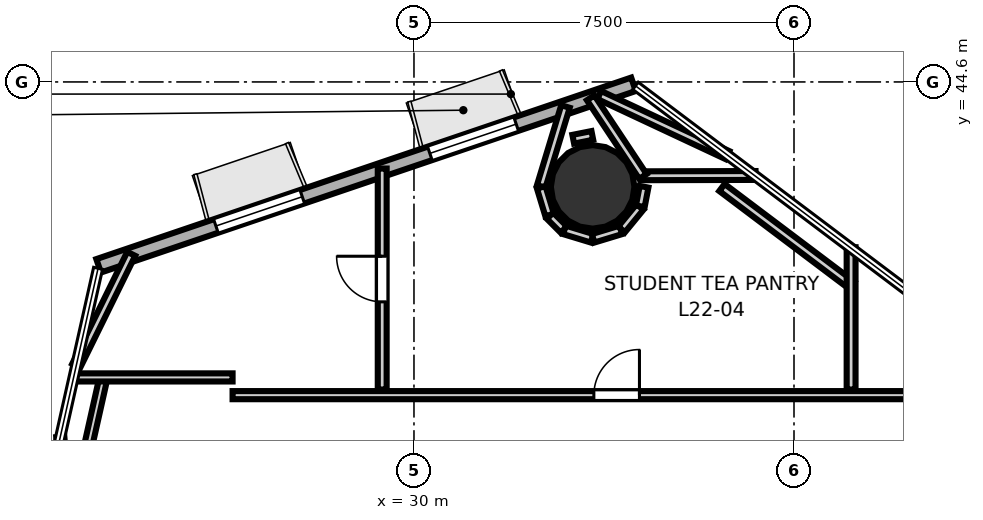
"""IFC4 building model, lengths in metres.
Left out: names, types, materials, properties, quantities, classifications, styles, units other than length and angle.
Written with IfcOpenShell. Run it as: python <this file> out.ifc"""

import sys

from ifc_helpers import new_model, si_unit, direction, frame, frame_2d, origin, origin_2d, place, context, subcontext, project, spatial, rectangle, hollow_circle, extrude, element, fill, save


model = new_model("IFC4")
c1 = context("Model", 3, precision=1e-05, world=origin(), true_north=direction((0.0, 1.0)))
c2 = subcontext(c1, "Body", "Model", "MODEL_VIEW")
j1 = project(units=[si_unit("LENGTHUNIT", "METRE"), si_unit("PLANEANGLEUNIT", "RADIAN")], contexts=[c1])
p1 = place(None, origin())
s1 = spatial("IfcSite", under=j1, at=p1, CompositionType="ELEMENT")
p2 = place(p1, origin())
s2 = spatial("IfcBuilding", under=s1, at=p2, CompositionType="ELEMENT")
p3 = place(p2, frame((0.0, 0.0, 89.5)))
s3 = spatial("IfcBuildingStorey", under=s2, at=p3, CompositionType="ELEMENT", Elevation=89.5)
p4 = place(p3, frame((33.526, 42.529, 0.0), z_axis=(0.0, 0.0, 1.0), x_axis=(1.0, 0.0, 0.0)))
e1 = element("IfcColumn", 1, at=p4, inside=s3, PredefinedType="COLUMN", context=c2, shape_type="SweptSolid", body=[
    extrude(hollow_circle(Radius=0.825, WallThickness=0.04, at=origin_2d()), origin(), (0.0, 0.0, 1.0), 3.7),
])
p5 = place(p3, frame((34.332, 44.553, 0.0), z_axis=(0.0, 0.0, 1.0), x_axis=(-0.946952159866, -0.321374558615, 0.0)))
e2 = element("IfcWall", 2, at=p5, inside=s3, PredefinedType="SOLIDWALL", context=c2, shape_type="SweptSolid", body=[
    extrude(rectangle(XDim=11.147, YDim=0.28, at=frame_2d((5.573, 0.0))), origin(), (0.0, 0.0, 1.0), 3.4),
])
p6 = place(p5, frame((2.444, 0.0, 0.85)))
e3 = element("IfcOpeningElement", 3, at=p6, cuts=e2, PredefinedType="OPENING", context=c2, shape_type="SweptSolid", body=[
    extrude(rectangle(XDim=1.8, YDim=2.1, at=frame_2d((0.9, 1.05))), frame((0.0, 0.15, 0.0), z_axis=(0.0, -1.0, 0.0), x_axis=(1.0, 0.0, 0.0)), (0.0, 0.0, 1.0), 0.3),
])
p7 = place(p5, frame((6.903, 0.0, 0.85)))
e4 = element("IfcOpeningElement", 4, at=p7, cuts=e2, PredefinedType="OPENING", context=c2, shape_type="SweptSolid", body=[
    extrude(rectangle(XDim=1.8, YDim=2.1, at=frame_2d((0.9, 1.05))), frame((0.0, 0.15, 0.0), z_axis=(0.0, -1.0, 0.0), x_axis=(1.0, 0.0, 0.0)), (0.0, 0.0, 1.0), 0.3),
])
p8 = place(p3, frame((23.581, 31.197, 0.0), z_axis=(0.0, 0.0, 1.0), x_axis=(-0.087369191834, 0.996176000674, 0.0)))
e5 = element("IfcWall", 5, at=p8, inside=s3, PredefinedType="PARTITIONING", context=c2, shape_type="SweptSolid", body=[
    extrude(rectangle(XDim=6.424, YDim=0.16, at=frame_2d((3.212, 0.0))), origin(), (0.0, 0.0, 1.0), 2.678),
])
p9 = place(p3, frame((23.58, 37.464, 0.0), z_axis=(0.0, 0.0, 1.0), x_axis=(0.219055756509, 0.97571234262, 0.0)))
e6 = element("IfcWall", 6, at=p9, inside=s3, PredefinedType="PARTITIONING", context=c2, shape_type="SweptSolid", body=[
    extrude(rectangle(XDim=1.362, YDim=0.16, at=frame_2d((0.681, 0.0))), origin(), (0.0, 0.0, 1.0), 2.72),
])
p10 = place(p3, frame((23.262, 38.769, 0.0), z_axis=(0.0, 0.0, 1.0), x_axis=(1.0, 0.0, 0.0)))
e7 = element("IfcWall", 7, at=p10, inside=s3, PredefinedType="PARTITIONING", context=c2, shape_type="SweptSolid", body=[
    extrude(rectangle(XDim=3.157, YDim=0.16, at=frame_2d((1.579, 0.0))), origin(), (0.0, 0.0, 1.0), 2.72),
])
p11 = place(p3, frame((26.42, 38.419, 0.0), z_axis=(0.0, 0.0, 1.0), x_axis=(1.0, 0.0, 0.0)))
e8 = element("IfcWall", 8, at=p11, inside=s3, PredefinedType="PARTITIONING", context=c2, shape_type="SweptSolid", body=[
    extrude(rectangle(XDim=16.075, YDim=0.16, at=frame_2d((8.037, 0.0))), origin(), (0.0, 0.0, 1.0), 2.678),
])
p12 = place(p11, frame((7.13, 0.0, 0.0)))
e9 = element("IfcOpeningElement", 9, at=p12, cuts=e8, PredefinedType="OPENING", context=c2, shape_type="SweptSolid", body=[
    extrude(rectangle(XDim=0.9, YDim=2.1, at=frame_2d((0.45, 1.05))), frame((0.0, 0.09, 0.0), z_axis=(0.0, -1.0, 0.0), x_axis=(1.0, 0.0, 0.0)), (0.0, 0.0, 1.0), 0.18),
])
p13 = place(p3, frame((29.373, 38.53, 0.0), z_axis=(0.0, 0.0, 1.0), x_axis=(0.0, 1.0, 0.0)))
e10 = element("IfcWall", 10, at=p13, inside=s3, PredefinedType="PLUMBINGWALL", context=c2, shape_type="SweptSolid", body=[
    extrude(rectangle(XDim=4.361, YDim=0.175, at=frame_2d((2.18, 0.0))), origin(), (0.0, 0.0, 1.0), 2.72),
])
p14 = place(p13, frame((1.73, 0.0, 0.0)))
e11 = element("IfcOpeningElement", 11, at=p14, cuts=e10, PredefinedType="OPENING", context=c2, shape_type="SweptSolid", body=[
    extrude(rectangle(XDim=0.9, YDim=2.1, at=frame_2d((0.45, 1.05))), frame((0.0, 0.097, 0.0), z_axis=(0.0, -1.0, 0.0), x_axis=(1.0, 0.0, 0.0)), (0.0, 0.0, 1.0), 0.195),
])
p15 = place(p3, frame((33.656, 44.342, 0.0), z_axis=(0.0, 0.0, 1.0), x_axis=(0.905579565103, -0.42417643884, 0.0)))
e12 = element("IfcWall", 12, at=p15, inside=s3, PredefinedType="PLUMBINGWALL", context=c2, shape_type="SweptSolid", body=[
    extrude(rectangle(XDim=2.794, YDim=0.175, at=frame_2d((1.397, 0.0))), origin(), (0.0, 0.0, 1.0), 2.72),
])
p16 = place(p3, frame((36.74, 42.754, 0.0), z_axis=(0.0, 0.0, 1.0), x_axis=(-0.999996880442, -0.002497820184, 0.0)))
e13 = element("IfcWall", 13, at=p16, inside=s3, PredefinedType="PLUMBINGWALL", context=c2, shape_type="SweptSolid", body=[
    extrude(rectangle(XDim=2.248, YDim=0.175, at=frame_2d((1.124, 0.0))), origin(), (0.0, 0.0, 1.0), 2.72),
])
p17 = place(p3, frame((34.518, 42.735, 0.0), z_axis=(0.0, 0.0, 1.0), x_axis=(-0.553581470988, 0.832795025789, 0.0)))
e14 = element("IfcWall", 14, at=p17, inside=s3, PredefinedType="PLUMBINGWALL", context=c2, shape_type="SweptSolid", body=[
    extrude(rectangle(XDim=1.864, YDim=0.175, at=frame_2d((0.932, 0.0))), origin(), (0.0, 0.0, 1.0), 2.72),
])
p18 = place(p3, frame((33.52, 43.544, 0.0), z_axis=(0.0, 0.0, 1.0), x_axis=(-0.980799947725, -0.195016569917, 0.0)))
e15 = element("IfcWall", 15, at=p18, inside=s3, PredefinedType="PLUMBINGWALL", context=c2, shape_type="SweptSolid", body=[
    extrude(rectangle(XDim=0.384, YDim=0.175, at=frame_2d((0.192, 0.0))), origin(), (0.0, 0.0, 1.0), 2.72),
])
p19 = place(p3, frame((32.99, 44.115, 0.0), z_axis=(0.0, 0.0, 1.0), x_axis=(-0.290336280759, -0.956924680461, 0.0)))
e16 = element("IfcWall", 16, at=p19, inside=s3, PredefinedType="PLUMBINGWALL", context=c2, shape_type="SweptSolid", body=[
    extrude(rectangle(XDim=1.648, YDim=0.175, at=frame_2d((0.824, 0.0))), origin(), (0.0, 0.0, 1.0), 2.72),
])
p20 = place(p3, frame((32.511, 42.52, 0.0), z_axis=(0.0, 0.0, 1.0), x_axis=(0.290362912899, -0.956916599716, 0.0)))
e17 = element("IfcWall", 17, at=p20, inside=s3, PredefinedType="PLUMBINGWALL", context=c2, shape_type="SweptSolid", body=[
    extrude(rectangle(XDim=0.572, YDim=0.175, at=frame_2d((0.286, 0.0))), origin(), (0.0, 0.0, 1.0), 2.72),
])
p21 = place(p3, frame((32.685, 41.96, 0.0), z_axis=(0.0, 0.0, 1.0), x_axis=(0.707106781187, -0.707106781187, 0.0)))
e18 = element("IfcWall", 18, at=p21, inside=s3, PredefinedType="PLUMBINGWALL", context=c2, shape_type="SweptSolid", body=[
    extrude(rectangle(XDim=0.384, YDim=0.175, at=frame_2d((0.192, 0.0))), origin(), (0.0, 0.0, 1.0), 2.678),
])
p22 = place(p3, frame((32.97, 41.68, 0.0), z_axis=(0.0, 0.0, 1.0), x_axis=(0.956952578659, -0.290244314669, 0.0)))
e19 = element("IfcWall", 19, at=p22, inside=s3, PredefinedType="PLUMBINGWALL", context=c2, shape_type="SweptSolid", body=[
    extrude(rectangle(XDim=0.572, YDim=0.175, at=frame_2d((0.286, 0.0))), origin(), (0.0, 0.0, 1.0), 2.678),
])
p23 = place(p3, frame((33.535, 41.514, 0.0), z_axis=(0.0, 0.0, 1.0), x_axis=(0.956952578659, 0.290244314669, 0.0)))
e20 = element("IfcWall", 20, at=p23, inside=s3, PredefinedType="PLUMBINGWALL", context=c2, shape_type="SweptSolid", body=[
    extrude(rectangle(XDim=0.572, YDim=0.175, at=frame_2d((0.286, 0.0))), origin(), (0.0, 0.0, 1.0), 2.72),
])
p24 = place(p3, frame((34.097, 41.69, 0.0), z_axis=(0.0, 0.0, 1.0), x_axis=(0.634329694458, 0.773062635709, 0.0)))
e21 = element("IfcWall", 21, at=p24, inside=s3, PredefinedType="PLUMBINGWALL", context=c2, shape_type="SweptSolid", body=[
    extrude(rectangle(XDim=0.572, YDim=0.175, at=frame_2d((0.286, 0.0))), origin(), (0.0, 0.0, 1.0), 2.678),
])
p25 = place(p3, frame((34.467, 42.146, 0.0), z_axis=(0.0, 0.0, 1.0), x_axis=(0.188455212737, 0.982081785185, 0.0)))
e22 = element("IfcWall", 22, at=p25, inside=s3, PredefinedType="PLUMBINGWALL", context=c2, shape_type="SweptSolid", body=[
    extrude(rectangle(XDim=0.393, YDim=0.175, at=frame_2d((0.196, 0.0))), origin(), (0.0, 0.0, 1.0), 2.72),
])
p26 = place(p3, frame((36.078, 42.517, 0.0), z_axis=(0.0, 0.0, 1.0), x_axis=(0.798764872269, -0.601643315286, 0.0)))
e23 = element("IfcWall", 23, at=p26, inside=s3, PredefinedType="PLUMBINGWALL", context=c2, shape_type="SweptSolid", body=[
    extrude(rectangle(XDim=3.207, YDim=0.175, at=frame_2d((1.603, 0.0))), origin(), (0.0, 0.0, 1.0), 2.72),
])
p27 = place(p3, frame((38.627, 41.338, 0.0), z_axis=(0.0, 0.0, 1.0), x_axis=(0.0, -1.0, 0.0)))
e24 = element("IfcWall", 24, at=p27, inside=s3, PredefinedType="PLUMBINGWALL", context=c2, shape_type="SweptSolid", body=[
    extrude(rectangle(XDim=2.808, YDim=0.175, at=frame_2d((1.404, 0.0))), origin(), (0.0, 0.0, 1.0), 2.678),
])
p28 = place(p3, frame((23.334, 38.999, 0.0), z_axis=(0.0, 0.0, 1.0), x_axis=(0.44113104015, 0.897442703138, 0.0)))
e25 = element("IfcWall", 25, at=p28, inside=s3, PredefinedType="PLUMBINGWALL", context=c2, shape_type="SweptSolid", body=[
    extrude(rectangle(XDim=2.461, YDim=0.175, at=frame_2d((1.23, 0.0))), origin(), (0.0, 0.0, 1.0), 2.72),
])
p29 = place(p12, origin())
e26 = element("IfcDoor", 26, at=p29, inside=s3, OperationType="SINGLE_SWING_RIGHT", PredefinedType="DOOR", context=c2, shape_type="SweptSolid", body=[
    extrude(rectangle(XDim=0.9, YDim=2.1, at=frame_2d((0.45, 1.05))), frame((0.0, 0.025, 0.0), z_axis=(0.0, -1.0, 0.0), x_axis=(1.0, 0.0, 0.0)), (0.0, 0.0, 1.0), 0.05),
])
fill(e9, e26)
p30 = place(p14, origin())
e27 = element("IfcDoor", 27, at=p30, inside=s3, OperationType="SINGLE_SWING_RIGHT", PredefinedType="DOOR", context=c2, shape_type="SweptSolid", body=[
    extrude(rectangle(XDim=0.9, YDim=2.1, at=frame_2d((0.45, 1.05))), frame((0.0, 0.025, 0.0), z_axis=(0.0, -1.0, 0.0), x_axis=(1.0, 0.0, 0.0)), (0.0, 0.0, 1.0), 0.05),
])
fill(e11, e27)
p31 = place(p6, origin())
e28 = element("IfcWindow", 28, at=p31, inside=s3, PartitioningType="SINGLE_PANEL", PredefinedType="WINDOW", context=c2, shape_type="SweptSolid", body=[
    extrude(rectangle(XDim=1.8, YDim=2.1, at=frame_2d((0.9, 1.05))), frame((0.0, 0.03, 0.0), z_axis=(0.0, -1.0, 0.0), x_axis=(1.0, 0.0, 0.0)), (0.0, 0.0, 1.0), 0.06),
])
fill(e3, e28)
p32 = place(p7, origin())
e29 = element("IfcWindow", 29, at=p32, inside=s3, PartitioningType="SINGLE_PANEL", PredefinedType="WINDOW", context=c2, shape_type="SweptSolid", body=[
    extrude(rectangle(XDim=1.8, YDim=2.1, at=frame_2d((0.9, 1.05))), frame((0.0, 0.03, 0.0), z_axis=(0.0, -1.0, 0.0), x_axis=(1.0, 0.0, 0.0)), (0.0, 0.0, 1.0), 0.06),
])
fill(e4, e29)
save(model, sys.argv[1])
